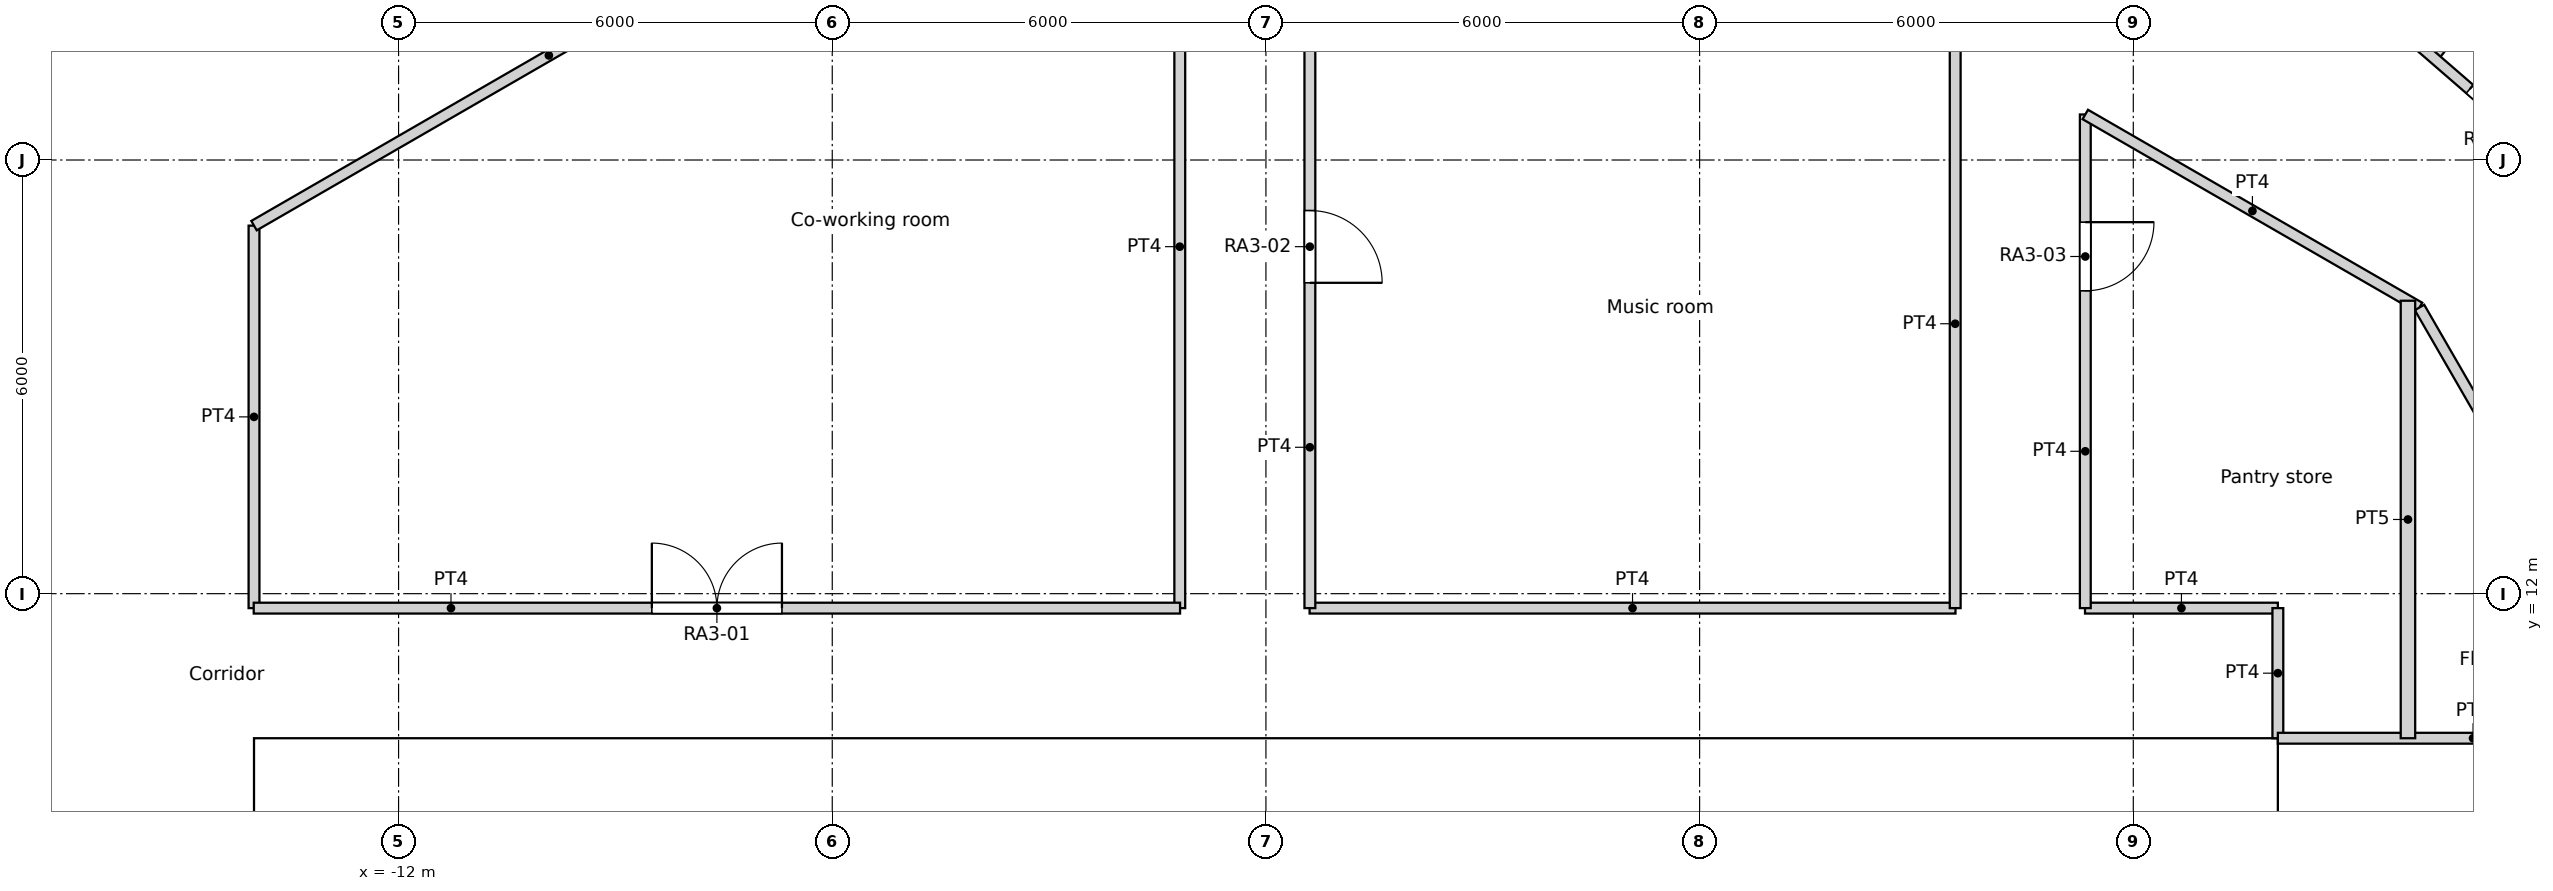
"""IFC4 building model, lengths in metres.
Left out: names, types, materials, properties, quantities, classifications, styles, units other than length and angle.
Written with IfcOpenShell. Run it as: python <this file> out.ifc"""

import sys

from ifc_helpers import new_model, si_unit, direction, frame, frame_2d, origin, origin_2d, place, context, subcontext, project, spatial, rectangle, circle, extrude, element, fill, save


model = new_model("IFC4")
c1 = context("Model", 3, precision=1e-05, world=origin(), true_north=direction((0.0, 1.0)))
c2 = subcontext(c1, "Body", "Model", "MODEL_VIEW")
j1 = project(units=[si_unit("LENGTHUNIT", "METRE"), si_unit("PLANEANGLEUNIT", "RADIAN")], contexts=[c1])
p1 = place(None, origin())
s1 = spatial("IfcSite", under=j1, at=p1, CompositionType="ELEMENT")
p2 = place(p1, origin())
s2 = spatial("IfcBuilding", under=s1, at=p2, CompositionType="ELEMENT")
p3 = place(p2, frame((0.0, 0.0, 49.8)))
s3 = spatial("IfcBuildingStorey", under=s2, at=p3, CompositionType="ELEMENT", Elevation=49.8)
for number, where, z_axis, x_axis in (
    (1, (14.659, 19.69, 0.0), (0.0, 0.0, 1.0), (1.0, 0.0, 0.0)),
    (2, (-16.846, 17.855, 0.0), (0.0, 0.0, 1.0), (1.0, 0.0, 0.0)),
):
    element("IfcColumn", number, at=place(p3, frame(where, z_axis=z_axis, x_axis=x_axis)), inside=s3, PredefinedType="COLUMN", context=c2, shape_type="SweptSolid", body=[
        extrude(circle(Radius=0.75, at=origin_2d()), origin(), (0.0, 0.0, 1.0), 3.6),
    ])
for number, where, z_axis, x_axis in (
    (3, (15.552, 10.603, 0.0), (0.0, 0.0, 1.0), (1.0, 0.0, 0.0)),
    (4, (11.735, 14.716, 0.0), (0.0, 0.0, 1.0), (1.0, 0.0, 0.0)),
    (5, (6.876, 17.521, 0.0), (0.0, 0.0, 1.0), (1.0, 0.0, 0.0)),
    (6, (1.406, 18.77, 0.0), (0.0, 0.0, 1.0), (1.0, 0.0, 0.0)),
    (7, (-4.188, 18.35, 0.0), (0.0, 0.0, 1.0), (1.0, 0.0, 0.0)),
    (8, (-9.411, 16.301, 0.0), (0.0, 0.0, 1.0), (1.0, 0.0, 0.0)),
    (9, (-13.798, 12.802, 0.0), (0.0, 0.0, 1.0), (1.0, 0.0, 0.0)),
):
    element("IfcColumn", number, at=place(p3, frame(where, z_axis=z_axis, x_axis=x_axis)), inside=s3, PredefinedType="COLUMN", context=c2, shape_type="SweptSolid", body=[
        extrude(circle(Radius=0.8, at=origin_2d()), origin(), (0.0, 0.0, 1.0), 3.6),
    ])
p4 = place(p3, frame((-14.0, 9.4, 0.0), z_axis=(0.0, 0.0, 1.0), x_axis=(1.0, 0.0, 0.0)))
e10 = element("IfcWall", 10, at=p4, inside=s3, PredefinedType="SOLIDWALL", context=c2, shape_type="SweptSolid", body=[
    extrude(rectangle(XDim=28.0, YDim=1.2, at=frame_2d((14.0, 0.0))), origin(), (0.0, 0.0, 1.0), 3.6),
])
p5 = place(p4, frame((9.8, 0.0, 0.0)))
e11 = element("IfcOpeningElement", 11, at=p5, cuts=e10, PredefinedType="OPENING", context=c2, shape_type="SweptSolid", body=[
    extrude(rectangle(XDim=1.8, YDim=2.1, at=frame_2d((0.9, 1.05))), frame((0.0, 0.6, 0.0), z_axis=(0.0, -1.0, 0.0), x_axis=(1.0, 0.0, 0.0)), (0.0, 0.0, 1.0), 1.2),
])
p6 = place(p3, frame((-14.004, 11.8, 0.0), z_axis=(0.0, 0.0, 1.0), x_axis=(1.0, 0.0, 0.0)))
e12 = element("IfcWall", 12, at=p6, inside=s3, PredefinedType="PARTITIONING", context=c2, shape_type="SweptSolid", body=[
    extrude(rectangle(XDim=12.816, YDim=0.15, at=frame_2d((6.408, 0.0))), origin(), (0.0, 0.0, 1.0), 3.15),
])
p7 = place(p6, frame((5.508, 0.0, 0.0)))
e13 = element("IfcOpeningElement", 13, at=p7, cuts=e12, PredefinedType="OPENING", context=c2, shape_type="SweptSolid", body=[
    extrude(rectangle(XDim=1.8, YDim=2.1, at=frame_2d((0.9, 1.05))), frame((0.0, 0.075, 0.0), z_axis=(0.0, -1.0, 0.0), x_axis=(1.0, 0.0, 0.0)), (0.0, 0.0, 1.0), 0.15),
])
p8 = place(p3, frame((0.604, 11.8, 0.0), z_axis=(0.0, 0.0, 1.0), x_axis=(1.0, 0.0, 0.0)))
e14 = element("IfcWall", 14, at=p8, inside=s3, PredefinedType="PARTITIONING", context=c2, shape_type="SweptSolid", body=[
    extrude(rectangle(XDim=8.936, YDim=0.15, at=frame_2d((4.468, 0.0))), origin(), (0.0, 0.0, 1.0), 3.15),
])
p9 = place(p3, frame((11.332, 11.8, 0.0), z_axis=(0.0, 0.0, 1.0), x_axis=(1.0, 0.0, 0.0)))
e15 = element("IfcWall", 15, at=p9, inside=s3, PredefinedType="PARTITIONING", context=c2, shape_type="SweptSolid", body=[
    extrude(rectangle(XDim=2.668, YDim=0.15, at=frame_2d((1.334, 0.0))), origin(), (0.0, 0.0, 1.0), 3.15),
])
p10 = place(p3, frame((14.0, 10.0, 0.0), z_axis=(0.0, 0.0, 1.0), x_axis=(0.0, 1.0, 0.0)))
e16 = element("IfcWall", 16, at=p10, inside=s3, PredefinedType="PARTITIONING", context=c2, shape_type="SweptSolid", body=[
    extrude(rectangle(XDim=1.8, YDim=0.15, at=frame_2d((0.9, 0.0))), origin(), (0.0, 0.0, 1.0), 3.15),
])
p11 = place(p3, frame((14.0, 10.0, 0.0), z_axis=(0.0, 0.0, 1.0), x_axis=(1.0, 0.0, 0.0)))
e17 = element("IfcWall", 17, at=p11, inside=s3, PredefinedType="PARTITIONING", context=c2, shape_type="SweptSolid", body=[
    extrude(rectangle(XDim=5.401, YDim=0.15, at=frame_2d((2.7, 0.0))), origin(), (0.0, 0.0, 1.0), 3.15),
])
p12 = place(p3, frame((15.96, 15.96, 0.0), z_axis=(0.0, 0.0, 1.0), x_axis=(0.499992689227, -0.86602962462, 0.0)))
e18 = element("IfcWall", 18, at=p12, inside=s3, PredefinedType="PARTITIONING", context=c2, shape_type="SweptSolid", body=[
    extrude(rectangle(XDim=6.882, YDim=0.15, at=frame_2d((3.441, 0.0))), origin(), (0.0, 0.0, 1.0), 3.15),
])
p13 = place(p12, frame((2.941, 0.0, 0.0)))
e19 = element("IfcOpeningElement", 19, at=p13, cuts=e18, PredefinedType="OPENING", context=c2, shape_type="SweptSolid", body=[
    extrude(rectangle(XDim=1.0, YDim=2.04, at=frame_2d((0.5, 1.02))), frame((0.0, 0.075, 0.0), z_axis=(0.0, -1.0, 0.0), x_axis=(1.0, 0.0, 0.0)), (0.0, 0.0, 1.0), 0.15),
])
p14 = place(p3, frame((10.932, 23.939, 0.0), z_axis=(0.0, 0.0, 1.0), x_axis=(0.755838982892, -0.654757536757, 0.0)))
e20 = element("IfcWall", 20, at=p14, inside=s3, PredefinedType="PARTITIONING", context=c2, shape_type="SweptSolid", body=[
    extrude(rectangle(XDim=14.83, YDim=0.15, at=frame_2d((7.415, 0.0))), origin(), (0.0, 0.0, 1.0), 3.15),
])
p15 = place(p14, frame((12.796, 0.0, 0.0)))
e21 = element("IfcOpeningElement", 21, at=p15, cuts=e20, PredefinedType="OPENING", context=c2, shape_type="SweptSolid", body=[
    extrude(rectangle(XDim=1.0, YDim=2.1, at=frame_2d((0.5, 1.05))), frame((0.0, 0.075, 0.0), z_axis=(0.0, -1.0, 0.0), x_axis=(1.0, 0.0, 0.0)), (0.0, 0.0, 1.0), 0.15),
])
p16 = place(p14, frame((7.572, 0.0, 0.0)))
e22 = element("IfcOpeningElement", 22, at=p16, cuts=e20, PredefinedType="OPENING", context=c2, shape_type="SweptSolid", body=[
    extrude(rectangle(XDim=1.0, YDim=2.1, at=frame_2d((0.5, 1.05))), frame((0.0, 0.075, 0.0), z_axis=(0.0, -1.0, 0.0), x_axis=(1.0, 0.0, 0.0)), (0.0, 0.0, 1.0), 0.15),
])
p17 = place(p14, frame((1.033, 0.0, 0.0)))
e23 = element("IfcOpeningElement", 23, at=p17, cuts=e20, PredefinedType="OPENING", context=c2, shape_type="SweptSolid", body=[
    extrude(rectangle(XDim=1.0, YDim=2.1, at=frame_2d((0.5, 1.05))), frame((0.0, 0.075, 0.0), z_axis=(0.0, -1.0, 0.0), x_axis=(1.0, 0.0, 0.0)), (0.0, 0.0, 1.0), 0.15),
])
p18 = place(p3, frame((-1.192, 11.8, 0.0), z_axis=(0.0, 0.0, 1.0), x_axis=(0.0, 1.0, 0.0)))
e24 = element("IfcWall", 24, at=p18, inside=s3, PredefinedType="PARTITIONING", context=c2, shape_type="SweptSolid", body=[
    extrude(rectangle(XDim=10.002, YDim=0.15, at=frame_2d((5.001, 0.0))), origin(), (0.0, 0.0, 1.0), 3.15),
])
p19 = place(p3, frame((-14.0, 17.092, 0.0), z_axis=(0.0, 0.0, 1.0), x_axis=(0.86602719091, 0.499996904595, 0.0)))
e25 = element("IfcWall", 25, at=p19, inside=s3, PredefinedType="PARTITIONING", context=c2, shape_type="SweptSolid", body=[
    extrude(rectangle(XDim=9.42, YDim=0.15, at=frame_2d((4.71, 0.0))), origin(), (0.0, 0.0, 1.0), 3.15),
])
p20 = place(p3, frame((-14.0, 11.8, 0.0), z_axis=(0.0, 0.0, 1.0), x_axis=(0.0, 1.0, 0.0)))
e26 = element("IfcWall", 26, at=p20, inside=s3, PredefinedType="PARTITIONING", context=c2, shape_type="SweptSolid", body=[
    extrude(rectangle(XDim=5.292, YDim=0.15, at=frame_2d((2.646, 0.0))), origin(), (0.0, 0.0, 1.0), 3.15),
])
p21 = place(p3, frame((9.536, 11.8, 0.0), z_axis=(0.0, 0.0, 1.0), x_axis=(0.0, 1.0, 0.0)))
e27 = element("IfcWall", 27, at=p21, inside=s3, PredefinedType="PARTITIONING", context=c2, shape_type="SweptSolid", body=[
    extrude(rectangle(XDim=7.869, YDim=0.15, at=frame_2d((3.935, 0.0))), origin(), (0.0, 0.0, 1.0), 3.15),
])
p22 = place(p3, frame((0.608, 11.8, 0.0), z_axis=(0.0, 0.0, 1.0), x_axis=(0.0, 1.0, 0.0)))
e28 = element("IfcWall", 28, at=p22, inside=s3, PredefinedType="PARTITIONING", context=c2, shape_type="SweptSolid", body=[
    extrude(rectangle(XDim=10.002, YDim=0.15, at=frame_2d((5.001, 0.0))), origin(), (0.0, 0.0, 1.0), 3.15),
])
p23 = place(p22, frame((4.501, 0.0, 0.0)))
e29 = element("IfcOpeningElement", 29, at=p23, cuts=e28, PredefinedType="OPENING", context=c2, shape_type="SweptSolid", body=[
    extrude(rectangle(XDim=1.0, YDim=2.04, at=frame_2d((0.5, 1.02))), frame((0.0, 0.075, 0.0), z_axis=(0.0, -1.0, 0.0), x_axis=(1.0, 0.0, 0.0)), (0.0, 0.0, 1.0), 0.15),
])
p24 = place(p3, frame((11.336, 18.63, 0.0), z_axis=(0.0, 0.0, 1.0), x_axis=(0.866056911224, -0.499945423543, 0.0)))
e30 = element("IfcWall", 30, at=p24, inside=s3, PredefinedType="PARTITIONING", context=c2, shape_type="SweptSolid", body=[
    extrude(rectangle(XDim=5.339, YDim=0.15, at=frame_2d((2.67, 0.0))), origin(), (0.0, 0.0, 1.0), 3.15),
])
p25 = place(p3, frame((11.336, 11.8, 0.0), z_axis=(0.0, 0.0, 1.0), x_axis=(0.0, 1.0, 0.0)))
e31 = element("IfcWall", 31, at=p25, inside=s3, PredefinedType="PARTITIONING", context=c2, shape_type="SweptSolid", body=[
    extrude(rectangle(XDim=6.83, YDim=0.15, at=frame_2d((3.415, 0.0))), origin(), (0.0, 0.0, 1.0), 3.15),
])
p26 = place(p25, frame((4.39, 0.0, 0.0)))
e32 = element("IfcOpeningElement", 32, at=p26, cuts=e31, PredefinedType="OPENING", context=c2, shape_type="SweptSolid", body=[
    extrude(rectangle(XDim=0.95, YDim=2.1, at=frame_2d((0.475, 1.05))), frame((0.0, 0.075, 0.0), z_axis=(0.0, -1.0, 0.0), x_axis=(1.0, 0.0, 0.0)), (0.0, 0.0, 1.0), 0.15),
])
p27 = place(p3, frame((15.8, 10.0, 0.0), z_axis=(0.0, 0.0, 1.0), x_axis=(0.0, 1.0, 0.0)))
e33 = element("IfcWall", 33, at=p27, inside=s3, PredefinedType="PARTITIONING", context=c2, shape_type="SweptSolid", body=[
    extrude(rectangle(XDim=6.053, YDim=0.2, at=frame_2d((3.026, 0.0))), origin(), (0.0, 0.0, 1.0), 3.15),
])
p28 = place(p3, frame((16.168, 19.404, 0.0), z_axis=(0.0, 0.0, 1.0), x_axis=(0.618142414415, 0.786066126672, 0.0)))
e34 = element("IfcWall", 34, at=p28, inside=s3, PredefinedType="PARTITIONING", context=c2, shape_type="SweptSolid", body=[
    extrude(rectangle(XDim=2.453, YDim=0.1, at=frame_2d((1.226, 0.0))), origin(), (0.0, 0.0, 1.0), 3.15),
])
p29 = place(p28, frame((0.776, 0.0, 0.0)))
e35 = element("IfcOpeningElement", 35, at=p29, cuts=e34, PredefinedType="OPENING", context=c2, shape_type="SweptSolid", body=[
    extrude(rectangle(XDim=0.9, YDim=2.04, at=frame_2d((0.45, 1.02))), frame((0.0, 0.05, 0.0), z_axis=(0.0, -1.0, 0.0), x_axis=(1.0, 0.0, 0.0)), (0.0, 0.0, 1.0), 0.1),
])
p30 = place(p5, origin())
e36 = element("IfcDoor", 36, at=p30, inside=s3, OperationType="DOUBLE_DOOR_SINGLE_SWING", PredefinedType="DOOR", context=c2, shape_type="SweptSolid", body=[
    extrude(rectangle(XDim=1.8, YDim=2.1, at=frame_2d((0.9, 1.05))), frame((0.0, 0.025, 0.0), z_axis=(0.0, -1.0, 0.0), x_axis=(1.0, 0.0, 0.0)), (0.0, 0.0, 1.0), 0.05),
])
fill(e11, e36)
p31 = place(p7, origin())
e37 = element("IfcDoor", 37, at=p31, inside=s3, OperationType="DOUBLE_DOOR_SINGLE_SWING", PredefinedType="DOOR", context=c2, shape_type="SweptSolid", body=[
    extrude(rectangle(XDim=1.8, YDim=2.1, at=frame_2d((0.9, 1.05))), frame((0.0, 0.025, 0.0), z_axis=(0.0, -1.0, 0.0), x_axis=(1.0, 0.0, 0.0)), (0.0, 0.0, 1.0), 0.05),
])
fill(e13, e37)
p32 = place(p23, origin())
e38 = element("IfcDoor", 38, at=p32, inside=s3, OperationType="SINGLE_SWING_RIGHT", PredefinedType="DOOR", context=c2, shape_type="SweptSolid", body=[
    extrude(rectangle(XDim=1.0, YDim=2.04, at=frame_2d((0.5, 1.02))), frame((0.0, 0.025, 0.0), z_axis=(0.0, -1.0, 0.0), x_axis=(1.0, 0.0, 0.0)), (0.0, 0.0, 1.0), 0.05),
])
fill(e29, e38)
p33 = place(p26, origin())
e39 = element("IfcDoor", 39, at=p33, inside=s3, OperationType="SINGLE_SWING_LEFT", PredefinedType="DOOR", context=c2, shape_type="SweptSolid", body=[
    extrude(rectangle(XDim=0.95, YDim=2.1, at=frame_2d((0.475, 1.05))), frame((0.0, 0.025, 0.0), z_axis=(0.0, -1.0, 0.0), x_axis=(1.0, 0.0, 0.0)), (0.0, 0.0, 1.0), 0.05),
])
fill(e32, e39)
p34 = place(p16, origin())
e40 = element("IfcDoor", 40, at=p34, inside=s3, OperationType="SINGLE_SWING_LEFT", PredefinedType="DOOR", context=c2, shape_type="SweptSolid", body=[
    extrude(rectangle(XDim=1.0, YDim=2.1, at=frame_2d((0.5, 1.05))), frame((0.0, 0.025, 0.0), z_axis=(0.0, -1.0, 0.0), x_axis=(1.0, 0.0, 0.0)), (0.0, 0.0, 1.0), 0.05),
])
fill(e22, e40)
save(model, sys.argv[1])
